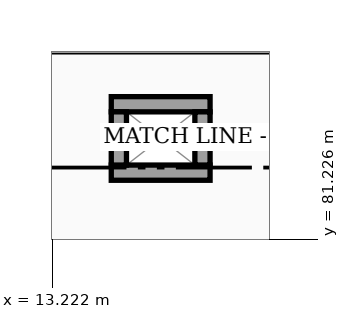
"""IFC4 building model, lengths in metres.
Left out: names, types, materials, properties, quantities, classifications, styles, units other than length and angle.
Written with IfcOpenShell. Run it as: python <this file> out.ifc"""

import sys

from ifc_helpers import new_model, si_unit, direction, frame, frame_2d, origin, place, context, subcontext, project, spatial, rectangle, extrude, element, save


model = new_model("IFC4")
c1 = context("Model", 3, precision=1e-05, world=origin(), true_north=direction((0.0, 1.0)))
c2 = subcontext(c1, "Body", "Model", "MODEL_VIEW")
j1 = project(units=[si_unit("LENGTHUNIT", "METRE"), si_unit("PLANEANGLEUNIT", "RADIAN")], contexts=[c1])
p1 = place(None, origin())
s1 = spatial("IfcSite", under=j1, at=p1, CompositionType="ELEMENT")
p2 = place(p1, origin())
s2 = spatial("IfcBuilding", under=s1, at=p2, CompositionType="ELEMENT")
p3 = place(p2, frame((0.0, 0.0, 12.3)))
s3 = spatial("IfcBuildingStorey", under=s2, at=p3, CompositionType="ELEMENT", Elevation=12.3)
for number, where, z_axis, x_axis in (
    (1, (15.3, 82.1, 0.0), (0.0, 0.0, 1.0), (-1.0, 0.0, 0.0)),
    (2, (14.0, 83.0, 0.0), (0.0, 0.0, 1.0), (1.0, 0.0, 0.0)),
):
    element("IfcWall", number, at=place(p3, frame(where, z_axis=z_axis, x_axis=x_axis)), inside=s3, PredefinedType="PARTITIONING", context=c2, shape_type="SweptSolid", body=[
        extrude(rectangle(XDim=1.3, YDim=0.2, at=frame_2d((0.65, 0.0))), origin(), (0.0, 0.0, 1.0), 3.65),
    ])
for number, where, z_axis, x_axis in (
    (3, (14.1, 82.2, 0.0), (0.0, 0.0, 1.0), (0.0, 1.0, 0.0)),
    (4, (15.2, 82.9, 0.0), (0.0, 0.0, 1.0), (0.0, -1.0, 0.0)),
):
    element("IfcWall", number, at=place(p3, frame(where, z_axis=z_axis, x_axis=x_axis)), inside=s3, PredefinedType="PARTITIONING", context=c2, shape_type="SweptSolid", body=[
        extrude(rectangle(XDim=0.7, YDim=0.2, at=frame_2d((0.35, 0.0))), origin(), (0.0, 0.0, 1.0), 3.65),
    ])
save(model, sys.argv[1])
